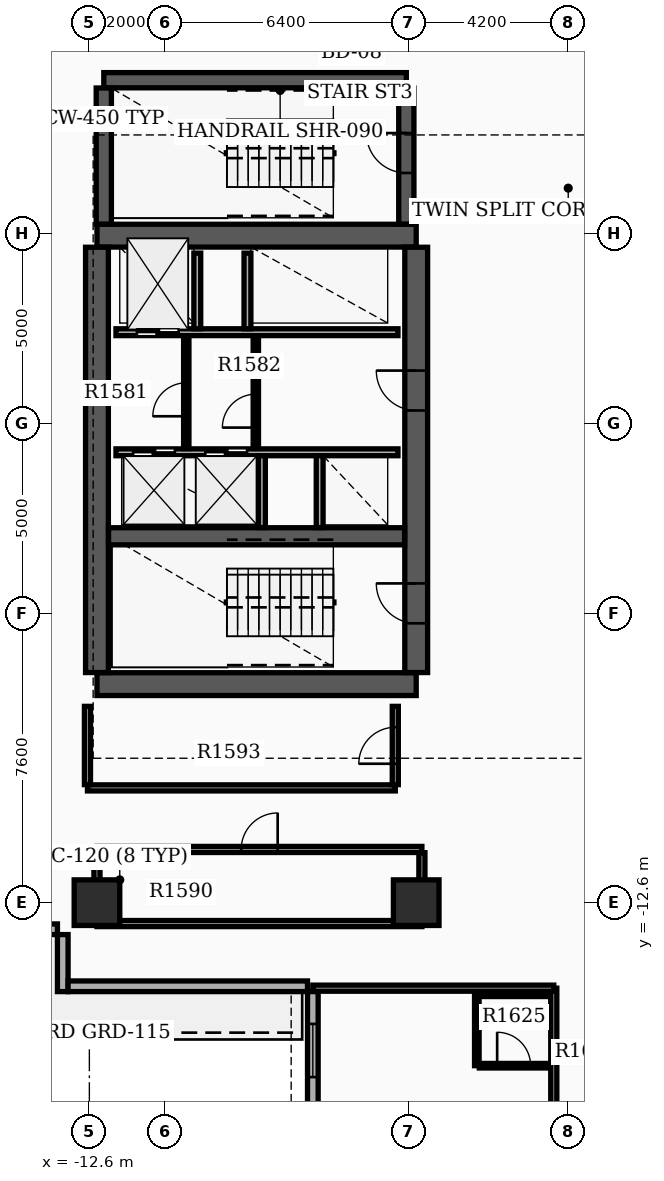
"""IFC4 building model, lengths in metres.
Left out: names, types, materials, properties, quantities, classifications, styles, units other than length and angle.
Written with IfcOpenShell. Run it as: python <this file> out.ifc"""

import sys

from ifc_helpers import new_model, si_unit, direction, frame, frame_2d, origin, origin_2d, place, context, subcontext, project, spatial, rectangle, extrude, element, fill, save


model = new_model("IFC4")
c1 = context("Model", 3, precision=1e-05, world=origin(), true_north=direction((0.0, 1.0)))
c2 = subcontext(c1, "Body", "Model", "MODEL_VIEW")
j1 = project(units=[si_unit("LENGTHUNIT", "METRE"), si_unit("PLANEANGLEUNIT", "RADIAN")], contexts=[c1])
p1 = place(None, origin())
s1 = spatial("IfcSite", under=j1, at=p1, CompositionType="ELEMENT")
p2 = place(p1, origin())
s2 = spatial("IfcBuilding", under=s1, at=p2, CompositionType="ELEMENT")
p3 = place(p2, frame((0.0, 0.0, 104.7)))
s3 = spatial("IfcBuildingStorey", under=s2, at=p3, CompositionType="ELEMENT", Elevation=104.7)
for number, where, z_axis, x_axis in (
    (1, (-12.4, -6.85, 0.0), (0.0, 0.0, 1.0), (1.0, 0.0, 0.0)),
    (2, (-12.4, 4.95, 0.0), (0.0, 0.0, 1.0), (1.0, 0.0, 0.0)),
):
    element("IfcWall", number, at=place(p3, frame(where, z_axis=z_axis, x_axis=x_axis)), inside=s3, PredefinedType="SHEAR", context=c2, shape_type="SweptSolid", body=[
        extrude(rectangle(XDim=8.4, YDim=0.6, at=frame_2d((4.2, 0.0))), origin(), (0.0, 0.0, 1.0), 3.7),
    ])
p4 = place(p3, frame((-12.4, -6.545, 0.0), z_axis=(0.0, 0.0, 1.0), x_axis=(0.0, 1.0, 0.0)))
e3 = element("IfcWall", 3, at=p4, inside=s3, PredefinedType="SHEAR", context=c2, shape_type="SweptSolid", body=[
    extrude(rectangle(XDim=11.19, YDim=0.6, at=frame_2d((5.595, 0.0))), origin(), (0.0, 0.0, 1.0), 3.7),
])
p5 = place(p3, frame((-4.0, -6.545, 0.0), z_axis=(0.0, 0.0, 1.0), x_axis=(0.0, 1.0, 0.0)))
e4 = element("IfcWall", 4, at=p5, inside=s3, PredefinedType="SHEAR", context=c2, shape_type="SweptSolid", body=[
    extrude(rectangle(XDim=11.19, YDim=0.6, at=frame_2d((5.595, 0.0))), origin(), (0.0, 0.0, 1.0), 3.7),
])
p6 = place(p5, frame((1.295, 0.0, 0.0)))
e5 = element("IfcOpeningElement", 5, at=p6, cuts=e4, PredefinedType="OPENING", context=c2, shape_type="SweptSolid", body=[
    extrude(rectangle(XDim=1.05, YDim=2.15, at=frame_2d((0.525, 1.075))), frame((0.0, 0.31, 0.0), z_axis=(0.0, -1.0, 0.0), x_axis=(1.0, 0.0, 0.0)), (0.0, 0.0, 1.0), 0.62),
])
p7 = place(p5, frame((6.895, 0.0, 0.0)))
e6 = element("IfcOpeningElement", 6, at=p7, cuts=e4, PredefinedType="OPENING", context=c2, shape_type="SweptSolid", body=[
    extrude(rectangle(XDim=1.05, YDim=2.15, at=frame_2d((0.525, 1.075))), frame((0.0, 0.31, 0.0), z_axis=(0.0, -1.0, 0.0), x_axis=(1.0, 0.0, 0.0)), (0.0, 0.0, 1.0), 0.62),
])
p8 = place(p3, frame((-12.095, -2.96, 0.0), z_axis=(0.0, 0.0, 1.0), x_axis=(1.0, 0.0, 0.0)))
e7 = element("IfcWall", 7, at=p8, inside=s3, PredefinedType="SHEAR", context=c2, shape_type="SweptSolid", body=[
    extrude(rectangle(XDim=7.79, YDim=0.45, at=frame_2d((3.895, 0.0))), origin(), (0.0, 0.0, 1.0), 3.7),
])
p9 = place(p3, frame((-12.22, 9.04, 0.0), z_axis=(0.0, 0.0, 1.0), x_axis=(1.0, 0.0, 0.0)))
e8 = element("IfcWall", 8, at=p9, inside=s3, PredefinedType="SHEAR", context=c2, shape_type="SweptSolid", body=[
    extrude(rectangle(XDim=7.96, YDim=0.4, at=frame_2d((3.98, 0.0))), origin(), (0.0, 0.0, 1.0), 3.7),
])
p10 = place(p3, frame((-12.22, 5.255, 0.0), z_axis=(0.0, 0.0, 1.0), x_axis=(0.0, 1.0, 0.0)))
e9 = element("IfcWall", 9, at=p10, inside=s3, PredefinedType="SHEAR", context=c2, shape_type="SweptSolid", body=[
    extrude(rectangle(XDim=3.58, YDim=0.4, at=frame_2d((1.79, 0.0))), origin(), (0.0, 0.0, 1.0), 3.7),
])
p11 = place(p3, frame((-4.26, 5.255, 0.0), z_axis=(0.0, 0.0, 1.0), x_axis=(0.0, 1.0, 0.0)))
e10 = element("IfcWall", 10, at=p11, inside=s3, PredefinedType="SHEAR", context=c2, shape_type="SweptSolid", body=[
    extrude(rectangle(XDim=3.58, YDim=0.4, at=frame_2d((1.79, 0.0))), origin(), (0.0, 0.0, 1.0), 3.7),
])
p12 = place(p11, frame((1.345, 0.0, 0.0)))
e11 = element("IfcOpeningElement", 11, at=p12, cuts=e10, PredefinedType="OPENING", context=c2, shape_type="SweptSolid", body=[
    extrude(rectangle(XDim=1.05, YDim=2.15, at=frame_2d((0.525, 1.075))), frame((0.0, 0.21, 0.0), z_axis=(0.0, -1.0, 0.0), x_axis=(1.0, 0.0, 0.0)), (0.0, 0.0, 1.0), 0.42),
])
for number, where, z_axis, x_axis in (
    (12, (-12.4, -12.6, 0.0), (0.0, 0.0, 1.0), (1.0, 0.0, 0.0)),
    (13, (-4.0, -12.6, 0.0), (0.0, 0.0, 1.0), (1.0, 0.0, 0.0)),
):
    element("IfcColumn", number, at=place(p3, frame(where, z_axis=z_axis, x_axis=x_axis)), inside=s3, PredefinedType="COLUMN", context=c2, shape_type="SweptSolid", body=[
        extrude(rectangle(XDim=1.2, YDim=1.2, at=origin_2d()), origin(), (0.0, 0.0, 1.0), 3.9),
    ])
p13 = place(p3, frame((-6.72, -14.94, 0.0), z_axis=(0.0, 0.0, 1.0), x_axis=(0.0, -1.0, 0.0)))
e14 = element("IfcWall", 14, at=p13, inside=s3, PredefinedType="STANDARD", context=c2, shape_type="SweptSolid", body=[
    extrude(rectangle(XDim=20.1, YDim=0.28, at=frame_2d((10.05, 0.0))), origin(), (0.0, 0.0, 1.0), 2.97),
])
p14 = place(p13, frame((0.85, 0.0, 0.8)))
e15 = element("IfcOpeningElement", 15, at=p14, cuts=e14, PredefinedType="OPENING", context=c2, shape_type="SweptSolid", body=[
    extrude(rectangle(XDim=1.4, YDim=1.6, at=frame_2d((0.7, 0.8))), frame((0.0, 0.15, 0.0), z_axis=(0.0, -1.0, 0.0), x_axis=(1.0, 0.0, 0.0)), (0.0, 0.0, 1.0), 0.3),
])
p15 = place(p13, frame((4.05, 0.0, 0.8)))
e16 = element("IfcOpeningElement", 16, at=p15, cuts=e14, PredefinedType="OPENING", context=c2, shape_type="SweptSolid", body=[
    extrude(rectangle(XDim=1.4, YDim=1.6, at=frame_2d((0.7, 0.8))), frame((0.0, 0.15, 0.0), z_axis=(0.0, -1.0, 0.0), x_axis=(1.0, 0.0, 0.0)), (0.0, 0.0, 1.0), 0.3),
])
p16 = place(p13, frame((7.25, 0.0, 0.8)))
e17 = element("IfcOpeningElement", 17, at=p16, cuts=e14, PredefinedType="OPENING", context=c2, shape_type="SweptSolid", body=[
    extrude(rectangle(XDim=1.4, YDim=1.6, at=frame_2d((0.7, 0.8))), frame((0.0, 0.15, 0.0), z_axis=(0.0, -1.0, 0.0), x_axis=(1.0, 0.0, 0.0)), (0.0, 0.0, 1.0), 0.3),
])
p17 = place(p13, frame((10.45, 0.0, 0.8)))
e18 = element("IfcOpeningElement", 18, at=p17, cuts=e14, PredefinedType="OPENING", context=c2, shape_type="SweptSolid", body=[
    extrude(rectangle(XDim=1.4, YDim=1.6, at=frame_2d((0.7, 0.8))), frame((0.0, 0.15, 0.0), z_axis=(0.0, -1.0, 0.0), x_axis=(1.0, 0.0, 0.0)), (0.0, 0.0, 1.0), 0.3),
])
p18 = place(p3, frame((-14.66, -13.3, 0.0), z_axis=(0.0, 0.0, 1.0), x_axis=(1.0, 0.0, 0.0)))
e19 = element("IfcWall", 19, at=p18, inside=s3, PredefinedType="STANDARD", context=c2, shape_type="SweptSolid", body=[
    extrude(rectangle(XDim=1.22, YDim=0.28, at=frame_2d((0.61, 0.0))), origin(), (0.0, 0.0, 1.0), 2.97),
])
p19 = place(p3, frame((-13.3, -13.44, 0.0), z_axis=(0.0, 0.0, 1.0), x_axis=(0.0, -1.0, 0.0)))
e20 = element("IfcWall", 20, at=p19, inside=s3, PredefinedType="STANDARD", context=c2, shape_type="SweptSolid", body=[
    extrude(rectangle(XDim=1.5, YDim=0.28, at=frame_2d((0.75, 0.0))), origin(), (0.0, 0.0, 1.0), 2.97),
])
p20 = place(p3, frame((-13.16, -14.8, 0.0), z_axis=(0.0, 0.0, 1.0), x_axis=(1.0, 0.0, 0.0)))
e21 = element("IfcWall", 21, at=p20, inside=s3, PredefinedType="STANDARD", context=c2, shape_type="SweptSolid", body=[
    extrude(rectangle(XDim=6.3, YDim=0.28, at=frame_2d((3.15, 0.0))), origin(), (0.0, 0.0, 1.0), 2.97),
])
p21 = place(p3, frame((-11.9, 2.41, 0.0), z_axis=(0.0, 0.0, 1.0), x_axis=(1.0, 0.0, 0.0)))
e22 = element("IfcWall", 22, at=p21, inside=s3, PredefinedType="SOLIDWALL", context=c2, shape_type="SweptSolid", body=[
    extrude(rectangle(XDim=7.42, YDim=0.18, at=frame_2d((3.71, 0.0))), origin(), (0.0, 0.0, 1.0), 2.96),
])
p22 = place(p21, frame((0.55, 0.0, 0.0)))
e23 = element("IfcOpeningElement", 23, at=p22, cuts=e22, PredefinedType="OPENING", context=c2, shape_type="SweptSolid", body=[
    extrude(rectangle(XDim=1.1, YDim=2.15, at=frame_2d((0.55, 1.075))), frame((0.0, 0.1, 0.0), z_axis=(0.0, -1.0, 0.0), x_axis=(1.0, 0.0, 0.0)), (0.0, 0.0, 1.0), 0.2),
])
p23 = place(p3, frame((-11.9, -0.75, 0.0), z_axis=(0.0, 0.0, 1.0), x_axis=(1.0, 0.0, 0.0)))
e24 = element("IfcWall", 24, at=p23, inside=s3, PredefinedType="SOLIDWALL", context=c2, shape_type="SweptSolid", body=[
    extrude(rectangle(XDim=7.42, YDim=0.18, at=frame_2d((3.71, 0.0))), origin(), (0.0, 0.0, 1.0), 2.96),
])
p24 = place(p23, frame((0.45, 0.0, 0.0)))
e25 = element("IfcOpeningElement", 25, at=p24, cuts=e24, PredefinedType="OPENING", context=c2, shape_type="SweptSolid", body=[
    extrude(rectangle(XDim=1.1, YDim=2.15, at=frame_2d((0.55, 1.075))), frame((0.0, 0.1, 0.0), z_axis=(0.0, -1.0, 0.0), x_axis=(1.0, 0.0, 0.0)), (0.0, 0.0, 1.0), 0.2),
])
p25 = place(p23, frame((2.35, 0.0, 0.0)))
e26 = element("IfcOpeningElement", 26, at=p25, cuts=e24, PredefinedType="OPENING", context=c2, shape_type="SweptSolid", body=[
    extrude(rectangle(XDim=1.1, YDim=2.15, at=frame_2d((0.55, 1.075))), frame((0.0, 0.1, 0.0), z_axis=(0.0, -1.0, 0.0), x_axis=(1.0, 0.0, 0.0)), (0.0, 0.0, 1.0), 0.2),
])
for number, where, z_axis, x_axis in (
    (27, (-9.76, 2.5, 0.0), (0.0, 0.0, 1.0), (0.0, 1.0, 0.0)),
    (28, (-8.44, 2.5, 0.0), (0.0, 0.0, 1.0), (0.0, 1.0, 0.0)),
):
    element("IfcWall", number, at=place(p3, frame(where, z_axis=z_axis, x_axis=x_axis)), inside=s3, PredefinedType="SOLIDWALL", context=c2, shape_type="SweptSolid", body=[
        extrude(rectangle(XDim=1.99, YDim=0.18, at=frame_2d((0.995, 0.0))), origin(), (0.0, 0.0, 1.0), 2.96),
    ])
for number, where, z_axis, x_axis in (
    (29, (-8.06, -2.73, 0.0), (0.0, 0.0, 1.0), (0.0, 1.0, 0.0)),
    (30, (-6.54, -2.73, 0.0), (0.0, 0.0, 1.0), (0.0, 1.0, 0.0)),
):
    element("IfcWall", number, at=place(p3, frame(where, z_axis=z_axis, x_axis=x_axis)), inside=s3, PredefinedType="SOLIDWALL", context=c2, shape_type="SweptSolid", body=[
        extrude(rectangle(XDim=1.89, YDim=0.18, at=frame_2d((0.945, 0.0))), origin(), (0.0, 0.0, 1.0), 2.96),
    ])
p26 = place(p3, frame((-8.22, -0.65, 0.0), z_axis=(0.0, 0.0, 1.0), x_axis=(0.0, 1.0, 0.0)))
e31 = element("IfcWall", 31, at=p26, inside=s3, PredefinedType="SOLIDWALL", context=c2, shape_type="SweptSolid", body=[
    extrude(rectangle(XDim=2.96, YDim=0.14, at=frame_2d((1.48, 0.0))), origin(), (0.0, 0.0, 1.0), 2.96),
])
p27 = place(p26, frame((0.55, 0.0, 0.0)))
e32 = element("IfcOpeningElement", 32, at=p27, cuts=e31, PredefinedType="OPENING", context=c2, shape_type="SweptSolid", body=[
    extrude(rectangle(XDim=0.88, YDim=2.1, at=frame_2d((0.44, 1.05))), frame((0.0, 0.08, 0.0), z_axis=(0.0, -1.0, 0.0), x_axis=(1.0, 0.0, 0.0)), (0.0, 0.0, 1.0), 0.16),
])
p28 = place(p3, frame((-10.05, -0.652, 0.0), z_axis=(0.0, 0.0, 1.0), x_axis=(0.0, 1.0, 0.0)))
e33 = element("IfcWall", 33, at=p28, inside=s3, PredefinedType="PARTITIONING", context=c2, shape_type="SweptSolid", body=[
    extrude(rectangle(XDim=2.962, YDim=0.14, at=frame_2d((1.481, 0.0))), origin(), (0.0, 0.0, 1.0), 2.96),
])
p29 = place(p28, frame((0.85, 0.0, 0.0)))
e34 = element("IfcOpeningElement", 34, at=p29, cuts=e33, PredefinedType="OPENING", context=c2, shape_type="SweptSolid", body=[
    extrude(rectangle(XDim=0.88, YDim=2.1, at=frame_2d((0.44, 1.05))), frame((0.0, 0.08, 0.0), z_axis=(0.0, -1.0, 0.0), x_axis=(1.0, 0.0, 0.0)), (0.0, 0.0, 1.0), 0.16),
])
p30 = place(p3, frame((-12.4, -13.15, 0.0), z_axis=(0.0, 0.0, 1.0), x_axis=(1.0, 0.0, 0.0)))
e35 = element("IfcWall", 35, at=p30, inside=s3, PredefinedType="PARTITIONING", context=c2, shape_type="SweptSolid", body=[
    extrude(rectangle(XDim=8.55, YDim=0.16, at=frame_2d((4.275, 0.0))), origin(), (0.0, 0.0, 1.0), 2.96),
])
p31 = place(p3, frame((-12.4, -11.2, 0.0), z_axis=(0.0, 0.0, 1.0), x_axis=(1.0, 0.0, 0.0)))
e36 = element("IfcWall", 36, at=p31, inside=s3, PredefinedType="PARTITIONING", context=c2, shape_type="SweptSolid", body=[
    extrude(rectangle(XDim=8.55, YDim=0.16, at=frame_2d((4.275, 0.0))), origin(), (0.0, 0.0, 1.0), 2.96),
])
p32 = place(p31, frame((3.795, 0.0, 0.0)))
e37 = element("IfcOpeningElement", 37, at=p32, cuts=e36, PredefinedType="OPENING", context=c2, shape_type="SweptSolid", body=[
    extrude(rectangle(XDim=0.96, YDim=2.15, at=frame_2d((0.48, 1.075))), frame((0.0, 0.09, 0.0), z_axis=(0.0, -1.0, 0.0), x_axis=(1.0, 0.0, 0.0)), (0.0, 0.0, 1.0), 0.18),
])
for number, where, z_axis, x_axis in (
    (38, (-12.4, -13.065, 0.0), (0.0, 0.0, 1.0), (0.0, 1.0, 0.0)),
    (39, (-3.85, -13.065, 0.0), (0.0, 0.0, 1.0), (0.0, 1.0, 0.0)),
):
    element("IfcWall", number, at=place(p3, frame(where, z_axis=z_axis, x_axis=x_axis)), inside=s3, PredefinedType="PARTITIONING", context=c2, shape_type="SweptSolid", body=[
        extrude(rectangle(XDim=1.78, YDim=0.16, at=frame_2d((0.89, 0.0))), origin(), (0.0, 0.0, 1.0), 2.96),
    ])
p33 = place(p3, frame((-12.65, -9.58, 0.0), z_axis=(0.0, 0.0, 1.0), x_axis=(1.0, 0.0, 0.0)))
e40 = element("IfcWall", 40, at=p33, inside=s3, PredefinedType="PARTITIONING", context=c2, shape_type="SweptSolid", body=[
    extrude(rectangle(XDim=8.1, YDim=0.16, at=frame_2d((4.05, 0.0))), origin(), (0.0, 0.0, 1.0), 2.96),
])
p34 = place(p3, frame((-12.65, -9.495, 0.0), z_axis=(0.0, 0.0, 1.0), x_axis=(0.0, 1.0, 0.0)))
e41 = element("IfcWall", 41, at=p34, inside=s3, PredefinedType="PARTITIONING", context=c2, shape_type="SweptSolid", body=[
    extrude(rectangle(XDim=2.06, YDim=0.16, at=frame_2d((1.03, 0.0))), origin(), (0.0, 0.0, 1.0), 2.96),
])
p35 = place(p3, frame((-4.55, -9.495, 0.0), z_axis=(0.0, 0.0, 1.0), x_axis=(0.0, 1.0, 0.0)))
e42 = element("IfcWall", 42, at=p35, inside=s3, PredefinedType="PARTITIONING", context=c2, shape_type="SweptSolid", body=[
    extrude(rectangle(XDim=2.06, YDim=0.16, at=frame_2d((1.03, 0.0))), origin(), (0.0, 0.0, 1.0), 2.96),
])
p36 = place(p35, frame((0.55, 0.0, 0.0)))
e43 = element("IfcOpeningElement", 43, at=p36, cuts=e42, PredefinedType="OPENING", context=c2, shape_type="SweptSolid", body=[
    extrude(rectangle(XDim=0.96, YDim=2.15, at=frame_2d((0.48, 1.075))), frame((0.0, 0.09, 0.0), z_axis=(0.0, -1.0, 0.0), x_axis=(1.0, 0.0, 0.0)), (0.0, 0.0, 1.0), 0.18),
])
p37 = place(p3, frame((-0.38, -14.85, 0.0), z_axis=(0.0, 0.0, 1.0), x_axis=(0.0, -1.0, 0.0)))
e44 = element("IfcWall", 44, at=p37, inside=s3, PredefinedType="PARTITIONING", context=c2, shape_type="SweptSolid", body=[
    extrude(rectangle(XDim=9.7, YDim=0.16, at=frame_2d((4.85, 0.0))), origin(), (0.0, 0.0, 1.0), 2.96),
])
p38 = place(p37, frame((7.704, 0.0, 0.0)))
e45 = element("IfcOpeningElement", 45, at=p38, cuts=e44, PredefinedType="OPENING", context=c2, shape_type="SweptSolid", body=[
    extrude(rectangle(XDim=0.96, YDim=2.15, at=frame_2d((0.48, 1.075))), frame((0.0, 0.09, 0.0), z_axis=(0.0, -1.0, 0.0), x_axis=(1.0, 0.0, 0.0)), (0.0, 0.0, 1.0), 0.18),
])
p39 = place(p3, frame((-0.38, -14.85, 0.0), z_axis=(0.0, 0.0, 1.0), x_axis=(-1.0, 0.0, 0.0)))
e46 = element("IfcWall", 46, at=p39, inside=s3, PredefinedType="PARTITIONING", context=c2, shape_type="SweptSolid", body=[
    extrude(rectangle(XDim=6.34, YDim=0.16, at=frame_2d((3.17, 0.0))), origin(), (0.0, 0.0, 1.0), 2.96),
])
p40 = place(p3, frame((-2.34, -16.89, 0.0), z_axis=(0.0, 0.0, 1.0), x_axis=(1.0, 0.0, 0.0)))
e47 = element("IfcWall", 47, at=p40, inside=s3, PredefinedType="PARTITIONING", context=c2, shape_type="SweptSolid", body=[
    extrude(rectangle(XDim=1.82, YDim=0.12, at=frame_2d((0.91, 0.0))), origin(), (0.0, 0.0, 1.0), 2.96),
])
p41 = place(p40, frame((0.47, 0.0, 0.0)))
e48 = element("IfcOpeningElement", 48, at=p41, cuts=e47, PredefinedType="OPENING", context=c2, shape_type="SweptSolid", body=[
    extrude(rectangle(XDim=0.88, YDim=2.1, at=frame_2d((0.44, 1.05))), frame((0.0, 0.07, 0.0), z_axis=(0.0, -1.0, 0.0), x_axis=(1.0, 0.0, 0.0)), (0.0, 0.0, 1.0), 0.14),
])
p42 = place(p3, frame((-2.34, -15.01, 0.0), z_axis=(0.0, 0.0, 1.0), x_axis=(1.0, 0.0, 0.0)))
e49 = element("IfcWall", 49, at=p42, inside=s3, PredefinedType="PARTITIONING", context=c2, shape_type="SweptSolid", body=[
    extrude(rectangle(XDim=1.82, YDim=0.12, at=frame_2d((0.91, 0.0))), origin(), (0.0, 0.0, 1.0), 2.96),
])
p43 = place(p3, frame((-2.405, -15.01, 0.0), z_axis=(0.0, 0.0, 1.0), x_axis=(0.0, -1.0, 0.0)))
e50 = element("IfcWall", 50, at=p43, inside=s3, PredefinedType="PARTITIONING", context=c2, shape_type="SweptSolid", body=[
    extrude(rectangle(XDim=1.88, YDim=0.12, at=frame_2d((0.94, 0.0))), origin(), (0.0, 0.0, 1.0), 2.96),
])
p44 = place(p14, origin())
e51 = element("IfcWindow", 51, at=p44, inside=s3, PartitioningType="SINGLE_PANEL", PredefinedType="WINDOW", context=c2, shape_type="SweptSolid", body=[
    extrude(rectangle(XDim=1.4, YDim=1.6, at=frame_2d((0.7, 0.8))), frame((0.0, 0.03, 0.0), z_axis=(0.0, -1.0, 0.0), x_axis=(1.0, 0.0, 0.0)), (0.0, 0.0, 1.0), 0.06),
])
fill(e15, e51)
p45 = place(p6, origin())
e52 = element("IfcDoor", 52, at=p45, inside=s3, OperationType="SINGLE_SWING_RIGHT", PredefinedType="DOOR", context=c2, shape_type="SweptSolid", body=[
    extrude(rectangle(XDim=1.05, YDim=2.15, at=frame_2d((0.525, 1.075))), frame((0.0, 0.025, 0.0), z_axis=(0.0, -1.0, 0.0), x_axis=(1.0, 0.0, 0.0)), (0.0, 0.0, 1.0), 0.05),
])
fill(e5, e52)
p46 = place(p7, origin())
e53 = element("IfcDoor", 53, at=p46, inside=s3, OperationType="SINGLE_SWING_RIGHT", PredefinedType="DOOR", context=c2, shape_type="SweptSolid", body=[
    extrude(rectangle(XDim=1.05, YDim=2.15, at=frame_2d((0.525, 1.075))), frame((0.0, 0.025, 0.0), z_axis=(0.0, -1.0, 0.0), x_axis=(1.0, 0.0, 0.0)), (0.0, 0.0, 1.0), 0.05),
])
fill(e6, e53)
p47 = place(p12, origin())
e54 = element("IfcDoor", 54, at=p47, inside=s3, OperationType="SINGLE_SWING_RIGHT", PredefinedType="DOOR", context=c2, shape_type="SweptSolid", body=[
    extrude(rectangle(XDim=1.05, YDim=2.15, at=frame_2d((0.525, 1.075))), frame((0.0, 0.025, 0.0), z_axis=(0.0, -1.0, 0.0), x_axis=(1.0, 0.0, 0.0)), (0.0, 0.0, 1.0), 0.05),
])
fill(e11, e54)
p48 = place(p22, origin())
e55 = element("IfcDoor", 55, at=p48, inside=s3, OperationType="DOUBLE_DOOR_SLIDING", PredefinedType="DOOR", context=c2, shape_type="SweptSolid", body=[
    extrude(rectangle(XDim=1.1, YDim=2.15, at=frame_2d((0.55, 1.075))), frame((0.0, 0.025, 0.0), z_axis=(0.0, -1.0, 0.0), x_axis=(1.0, 0.0, 0.0)), (0.0, 0.0, 1.0), 0.05),
])
fill(e23, e55)
p49 = place(p24, origin())
e56 = element("IfcDoor", 56, at=p49, inside=s3, OperationType="DOUBLE_DOOR_SLIDING", PredefinedType="DOOR", context=c2, shape_type="SweptSolid", body=[
    extrude(rectangle(XDim=1.1, YDim=2.15, at=frame_2d((0.55, 1.075))), frame((0.0, 0.025, 0.0), z_axis=(0.0, -1.0, 0.0), x_axis=(1.0, 0.0, 0.0)), (0.0, 0.0, 1.0), 0.05),
])
fill(e25, e56)
p50 = place(p25, origin())
e57 = element("IfcDoor", 57, at=p50, inside=s3, OperationType="DOUBLE_DOOR_SLIDING", PredefinedType="DOOR", context=c2, shape_type="SweptSolid", body=[
    extrude(rectangle(XDim=1.1, YDim=2.15, at=frame_2d((0.55, 1.075))), frame((0.0, 0.025, 0.0), z_axis=(0.0, -1.0, 0.0), x_axis=(1.0, 0.0, 0.0)), (0.0, 0.0, 1.0), 0.05),
])
fill(e26, e57)
p51 = place(p27, origin())
e58 = element("IfcDoor", 58, at=p51, inside=s3, OperationType="SINGLE_SWING_LEFT", PredefinedType="DOOR", context=c2, shape_type="SweptSolid", body=[
    extrude(rectangle(XDim=0.88, YDim=2.1, at=frame_2d((0.44, 1.05))), frame((0.0, 0.025, 0.0), z_axis=(0.0, -1.0, 0.0), x_axis=(1.0, 0.0, 0.0)), (0.0, 0.0, 1.0), 0.05),
])
fill(e32, e58)
p52 = place(p29, origin())
e59 = element("IfcDoor", 59, at=p52, inside=s3, OperationType="SINGLE_SWING_LEFT", PredefinedType="DOOR", context=c2, shape_type="SweptSolid", body=[
    extrude(rectangle(XDim=0.88, YDim=2.1, at=frame_2d((0.44, 1.05))), frame((0.0, 0.025, 0.0), z_axis=(0.0, -1.0, 0.0), x_axis=(1.0, 0.0, 0.0)), (0.0, 0.0, 1.0), 0.05),
])
fill(e34, e59)
p53 = place(p32, origin())
e60 = element("IfcDoor", 60, at=p53, inside=s3, OperationType="SINGLE_SWING_RIGHT", PredefinedType="DOOR", context=c2, shape_type="SweptSolid", body=[
    extrude(rectangle(XDim=0.96, YDim=2.15, at=frame_2d((0.48, 1.075))), frame((0.0, 0.025, 0.0), z_axis=(0.0, -1.0, 0.0), x_axis=(1.0, 0.0, 0.0)), (0.0, 0.0, 1.0), 0.05),
])
fill(e37, e60)
p54 = place(p36, origin())
e61 = element("IfcDoor", 61, at=p54, inside=s3, OperationType="SINGLE_SWING_LEFT", PredefinedType="DOOR", context=c2, shape_type="SweptSolid", body=[
    extrude(rectangle(XDim=0.96, YDim=2.15, at=frame_2d((0.48, 1.075))), frame((0.0, 0.025, 0.0), z_axis=(0.0, -1.0, 0.0), x_axis=(1.0, 0.0, 0.0)), (0.0, 0.0, 1.0), 0.05),
])
fill(e43, e61)
p55 = place(p41, origin())
e62 = element("IfcDoor", 62, at=p55, inside=s3, OperationType="SINGLE_SWING_LEFT", PredefinedType="DOOR", context=c2, shape_type="SweptSolid", body=[
    extrude(rectangle(XDim=0.88, YDim=2.1, at=frame_2d((0.44, 1.05))), frame((0.0, 0.025, 0.0), z_axis=(0.0, -1.0, 0.0), x_axis=(1.0, 0.0, 0.0)), (0.0, 0.0, 1.0), 0.05),
])
fill(e48, e62)
save(model, sys.argv[1])
